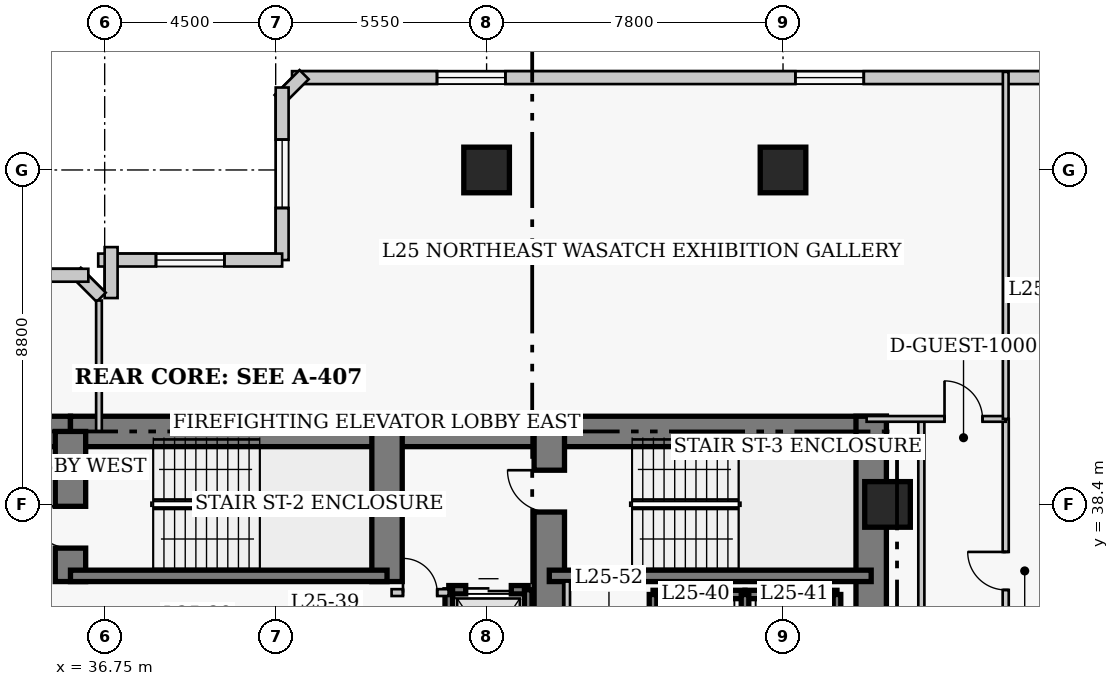
"""IFC4 building model, lengths in metres.
Left out: names, types, materials, properties, quantities, classifications, styles, units other than length and angle.
Written with IfcOpenShell. Run it as: python <this file> out.ifc"""

import sys

from ifc_helpers import new_model, si_unit, direction, frame, frame_2d, origin, origin_2d, place, context, subcontext, project, spatial, rectangle, extrude, element, fill, save


model = new_model("IFC4")
c1 = context("Model", 3, precision=1e-05, world=origin(), true_north=direction((0.0, 1.0)))
c2 = subcontext(c1, "Body", "Model", "MODEL_VIEW")
j1 = project(units=[si_unit("LENGTHUNIT", "METRE"), si_unit("PLANEANGLEUNIT", "RADIAN")], contexts=[c1])
p1 = place(None, origin())
s1 = spatial("IfcSite", under=j1, at=p1, CompositionType="ELEMENT")
p2 = place(p1, origin())
s2 = spatial("IfcBuilding", under=s1, at=p2, CompositionType="ELEMENT")
p3 = place(p2, frame((0.0, 0.0, 103.2)))
s3 = spatial("IfcBuildingStorey", under=s2, at=p3, CompositionType="ELEMENT", Elevation=103.2)
p4 = place(p3, frame((21.5, 40.32, 0.0), z_axis=(0.0, 0.0, 1.0), x_axis=(1.0, 0.0, 0.0)))
e1 = element("IfcWall", 1, at=p4, inside=s3, PredefinedType="SHEAR", context=c2, shape_type="SweptSolid", body=[
    extrude(rectangle(XDim=14.35, YDim=0.8, at=frame_2d((7.175, 0.0))), origin(), (0.0, 0.0, 1.0), 3.8),
])
p5 = place(p3, frame((35.85, 40.32, 0.0), z_axis=(0.0, 0.0, 1.0), x_axis=(1.0, 0.0, 0.0)))
e2 = element("IfcWall", 2, at=p5, inside=s3, PredefinedType="SHEAR", context=c2, shape_type="SweptSolid", body=[
    extrude(rectangle(XDim=12.6, YDim=0.8, at=frame_2d((6.3, 0.0))), origin(), (0.0, 0.0, 1.0), 3.8),
])
p6 = place(p3, frame((48.45, 40.32, 0.0), z_axis=(0.0, 0.0, 1.0), x_axis=(1.0, 0.0, 0.0)))
e3 = element("IfcWall", 3, at=p6, inside=s3, PredefinedType="SHEAR", context=c2, shape_type="SweptSolid", body=[
    extrude(rectangle(XDim=8.87, YDim=0.8, at=frame_2d((4.435, 0.0))), origin(), (0.0, 0.0, 1.0), 3.8),
])
p7 = place(p3, frame((56.92, 27.05, 0.0), z_axis=(0.0, 0.0, 1.0), x_axis=(0.0, 1.0, 0.0)))
e4 = element("IfcWall", 4, at=p7, inside=s3, PredefinedType="SHEAR", context=c2, shape_type="SweptSolid", body=[
    extrude(rectangle(XDim=13.67, YDim=0.8, at=frame_2d((6.835, 0.0))), origin(), (0.0, 0.0, 1.0), 3.8),
])
p8 = place(p3, frame((35.85, 36.37, 0.0), z_axis=(0.0, 0.0, 1.0), x_axis=(0.0, 1.0, 0.0)))
e5 = element("IfcWall", 5, at=p8, inside=s3, PredefinedType="SHEAR", context=c2, shape_type="SweptSolid", body=[
    extrude(rectangle(XDim=3.95, YDim=0.8, at=frame_2d((1.975, 0.0))), origin(), (0.0, 0.0, 1.0), 3.8),
])
p9 = place(p8, frame((0.88, 0.0, 0.0)))
e6 = element("IfcOpeningElement", 6, at=p9, cuts=e5, PredefinedType="OPENING", context=c2, shape_type="SweptSolid", body=[
    extrude(rectangle(XDim=1.1, YDim=2.15, at=frame_2d((0.55, 1.075))), frame((0.0, 0.41, 0.0), z_axis=(0.0, -1.0, 0.0), x_axis=(1.0, 0.0, 0.0)), (0.0, 0.0, 1.0), 0.82),
])
p10 = place(p3, frame((44.18, 36.37, 0.0), z_axis=(0.0, 0.0, 1.0), x_axis=(0.0, 1.0, 0.0)))
e7 = element("IfcWall", 7, at=p10, inside=s3, PredefinedType="SHEAR", context=c2, shape_type="SweptSolid", body=[
    extrude(rectangle(XDim=3.95, YDim=0.8, at=frame_2d((1.975, 0.0))), origin(), (0.0, 0.0, 1.0), 3.8),
])
p11 = place(p3, frame((48.45, 32.35, 0.0), z_axis=(0.0, 0.0, 1.0), x_axis=(0.0, 1.0, 0.0)))
e8 = element("IfcWall", 8, at=p11, inside=s3, PredefinedType="SHEAR", context=c2, shape_type="SweptSolid", body=[
    extrude(rectangle(XDim=7.97, YDim=0.8, at=frame_2d((3.985, 0.0))), origin(), (0.0, 0.0, 1.0), 3.8),
])
p12 = place(p11, frame((5.85, 0.0, 0.0)))
e9 = element("IfcOpeningElement", 9, at=p12, cuts=e8, PredefinedType="OPENING", context=c2, shape_type="SweptSolid", body=[
    extrude(rectangle(XDim=1.1, YDim=2.15, at=frame_2d((0.55, 1.075))), frame((0.0, 0.41, 0.0), z_axis=(0.0, -1.0, 0.0), x_axis=(1.0, 0.0, 0.0)), (0.0, 0.0, 1.0), 0.82),
])
p13 = place(p3, frame((35.85, 36.52, 0.0), z_axis=(0.0, 0.0, 1.0), x_axis=(1.0, 0.0, 0.0)))
e10 = element("IfcWall", 10, at=p13, inside=s3, PredefinedType="SHEAR", context=c2, shape_type="SweptSolid", body=[
    extrude(rectangle(XDim=8.33, YDim=0.3, at=frame_2d((4.165, 0.0))), origin(), (0.0, 0.0, 1.0), 3.8),
])
p14 = place(p3, frame((48.45, 36.52, 0.0), z_axis=(0.0, 0.0, 1.0), x_axis=(1.0, 0.0, 0.0)))
e11 = element("IfcWall", 11, at=p14, inside=s3, PredefinedType="SHEAR", context=c2, shape_type="SweptSolid", body=[
    extrude(rectangle(XDim=8.47, YDim=0.3, at=frame_2d((4.235, 0.0))), origin(), (0.0, 0.0, 1.0), 3.8),
])
for number, where, z_axis, x_axis in (
    (12, (46.8, 47.2, 0.0), (0.0, 0.0, 1.0), (1.0, 0.0, 0.0)),
    (13, (54.6, 47.2, 0.0), (0.0, 0.0, 1.0), (1.0, 0.0, 0.0)),
    (14, (57.35, 38.4, 0.0), (0.0, 0.0, 1.0), (1.0, 0.0, 0.0)),
):
    element("IfcColumn", number, at=place(p3, frame(where, z_axis=z_axis, x_axis=x_axis)), inside=s3, PredefinedType="COLUMN", context=c2, shape_type="SweptSolid", body=[
        extrude(rectangle(XDim=1.2, YDim=1.2, at=origin_2d()), origin(), (0.0, 0.0, 1.0), 3.8),
    ])
p15 = place(p3, frame((69.97, 49.63, 0.0), z_axis=(0.0, 0.0, 1.0), x_axis=(-1.0, 0.0, 0.0)))
e15 = element("IfcWall", 15, at=p15, inside=s3, PredefinedType="SOLIDWALL", context=c2, shape_type="SweptSolid", body=[
    extrude(rectangle(XDim=28.29, YDim=0.34, at=frame_2d((14.145, 0.0))), origin(), (0.0, 0.0, 1.0), 3.54),
])
p16 = place(p15, frame((3.815, 0.0, 0.85)))
e16 = element("IfcOpeningElement", 16, at=p16, cuts=e15, PredefinedType="OPENING", context=c2, shape_type="SweptSolid", body=[
    extrude(rectangle(XDim=1.8, YDim=1.8, at=frame_2d((0.9, 0.9))), frame((0.0, 0.18, 0.0), z_axis=(0.0, -1.0, 0.0), x_axis=(1.0, 0.0, 0.0)), (0.0, 0.0, 1.0), 0.36),
])
p17 = place(p15, frame((13.245, 0.0, 0.85)))
e17 = element("IfcOpeningElement", 17, at=p17, cuts=e15, PredefinedType="OPENING", context=c2, shape_type="SweptSolid", body=[
    extrude(rectangle(XDim=1.8, YDim=1.8, at=frame_2d((0.9, 0.9))), frame((0.0, 0.18, 0.0), z_axis=(0.0, -1.0, 0.0), x_axis=(1.0, 0.0, 0.0)), (0.0, 0.0, 1.0), 0.36),
])
p18 = place(p15, frame((22.675, 0.0, 0.85)))
e18 = element("IfcOpeningElement", 18, at=p18, cuts=e15, PredefinedType="OPENING", context=c2, shape_type="SweptSolid", body=[
    extrude(rectangle(XDim=1.8, YDim=1.8, at=frame_2d((0.9, 0.9))), frame((0.0, 0.18, 0.0), z_axis=(0.0, -1.0, 0.0), x_axis=(1.0, 0.0, 0.0)), (0.0, 0.0, 1.0), 0.36),
])
p19 = place(p3, frame((41.999, 49.708, 0.0), z_axis=(0.0, 0.0, 1.0), x_axis=(-0.707238225886, -0.706975312048, 0.0)))
e19 = element("IfcWall", 19, at=p19, inside=s3, PredefinedType="SOLIDWALL", context=c2, shape_type="SweptSolid", body=[
    extrude(rectangle(XDim=0.929, YDim=0.34, at=frame_2d((0.464, 0.0))), origin(), (0.0, 0.0, 1.0), 3.54),
])
p20 = place(p3, frame((41.42, 49.37, 0.0), z_axis=(0.0, 0.0, 1.0), x_axis=(0.0, -1.0, 0.0)))
e20 = element("IfcWall", 20, at=p20, inside=s3, PredefinedType="SOLIDWALL", context=c2, shape_type="SweptSolid", body=[
    extrude(rectangle(XDim=4.54, YDim=0.34, at=frame_2d((2.27, 0.0))), origin(), (0.0, 0.0, 1.0), 3.54),
])
p21 = place(p20, frame((1.37, 0.0, 0.85)))
e21 = element("IfcOpeningElement", 21, at=p21, cuts=e20, PredefinedType="OPENING", context=c2, shape_type="SweptSolid", body=[
    extrude(rectangle(XDim=1.8, YDim=1.8, at=frame_2d((0.9, 0.9))), frame((0.0, 0.18, 0.0), z_axis=(0.0, -1.0, 0.0), x_axis=(1.0, 0.0, 0.0)), (0.0, 0.0, 1.0), 0.36),
])
p22 = place(p3, frame((41.42, 44.83, 0.0), z_axis=(0.0, 0.0, 1.0), x_axis=(-1.0, 0.0, 0.0)))
e22 = element("IfcWall", 22, at=p22, inside=s3, PredefinedType="SOLIDWALL", context=c2, shape_type="SweptSolid", body=[
    extrude(rectangle(XDim=4.84, YDim=0.34, at=frame_2d((2.42, 0.0))), origin(), (0.0, 0.0, 1.0), 3.54),
])
p23 = place(p22, frame((1.52, 0.0, 0.85)))
e23 = element("IfcOpeningElement", 23, at=p23, cuts=e22, PredefinedType="OPENING", context=c2, shape_type="SweptSolid", body=[
    extrude(rectangle(XDim=1.8, YDim=1.8, at=frame_2d((0.9, 0.9))), frame((0.0, 0.18, 0.0), z_axis=(0.0, -1.0, 0.0), x_axis=(1.0, 0.0, 0.0)), (0.0, 0.0, 1.0), 0.36),
])
p24 = place(p3, frame((36.92, 45.17, 0.0), z_axis=(0.0, 0.0, 1.0), x_axis=(0.0, -1.0, 0.0)))
e24 = element("IfcWall", 24, at=p24, inside=s3, PredefinedType="SOLIDWALL", context=c2, shape_type="SweptSolid", body=[
    extrude(rectangle(XDim=1.34, YDim=0.34, at=frame_2d((0.67, 0.0))), origin(), (0.0, 0.0, 1.0), 3.54),
])
p25 = place(p3, frame((36.658, 43.852, 0.0), z_axis=(0.0, 0.0, 1.0), x_axis=(-0.707238225886, 0.706975312048, 0.0)))
e25 = element("IfcWall", 25, at=p25, inside=s3, PredefinedType="SOLIDWALL", context=c2, shape_type="SweptSolid", body=[
    extrude(rectangle(XDim=0.929, YDim=0.34, at=frame_2d((0.464, 0.0))), origin(), (0.0, 0.0, 1.0), 3.54),
])
p26 = place(p3, frame((36.32, 44.43, 0.0), z_axis=(0.0, 0.0, 1.0), x_axis=(-1.0, 0.0, 0.0)))
e26 = element("IfcWall", 26, at=p26, inside=s3, PredefinedType="SOLIDWALL", context=c2, shape_type="SweptSolid", body=[
    extrude(rectangle(XDim=28.29, YDim=0.34, at=frame_2d((14.145, 0.0))), origin(), (0.0, 0.0, 1.0), 3.54),
])
p27 = place(p26, frame((3.815, 0.0, 0.85)))
e27 = element("IfcOpeningElement", 27, at=p27, cuts=e26, PredefinedType="OPENING", context=c2, shape_type="SweptSolid", body=[
    extrude(rectangle(XDim=1.8, YDim=1.8, at=frame_2d((0.9, 0.9))), frame((0.0, 0.18, 0.0), z_axis=(0.0, -1.0, 0.0), x_axis=(1.0, 0.0, 0.0)), (0.0, 0.0, 1.0), 0.36),
])
p28 = place(p26, frame((13.245, 0.0, 0.85)))
e28 = element("IfcOpeningElement", 28, at=p28, cuts=e26, PredefinedType="OPENING", context=c2, shape_type="SweptSolid", body=[
    extrude(rectangle(XDim=1.8, YDim=1.8, at=frame_2d((0.9, 0.9))), frame((0.0, 0.18, 0.0), z_axis=(0.0, -1.0, 0.0), x_axis=(1.0, 0.0, 0.0)), (0.0, 0.0, 1.0), 0.36),
])
p29 = place(p26, frame((22.675, 0.0, 0.85)))
e29 = element("IfcOpeningElement", 29, at=p29, cuts=e26, PredefinedType="OPENING", context=c2, shape_type="SweptSolid", body=[
    extrude(rectangle(XDim=1.8, YDim=1.8, at=frame_2d((0.9, 0.9))), frame((0.0, 0.18, 0.0), z_axis=(0.0, -1.0, 0.0), x_axis=(1.0, 0.0, 0.0)), (0.0, 0.0, 1.0), 0.36),
])
p30 = place(p3, frame((51.18, 36.03, 0.0), z_axis=(0.0, 0.0, 1.0), x_axis=(1.0, 0.0, 0.0)))
e30 = element("IfcWall", 30, at=p30, inside=s3, PredefinedType="SHEAR", context=c2, shape_type="SweptSolid", body=[
    extrude(rectangle(XDim=2.42, YDim=0.22, at=frame_2d((1.21, 0.0))), origin(), (0.0, 0.0, 1.0), 3.8),
])
p31 = place(p3, frame((51.18, 33.17, 0.0), z_axis=(0.0, 0.0, 1.0), x_axis=(0.0, 1.0, 0.0)))
e31 = element("IfcWall", 31, at=p31, inside=s3, PredefinedType="SHEAR", context=c2, shape_type="SweptSolid", body=[
    extrude(rectangle(XDim=2.86, YDim=0.2, at=frame_2d((1.43, 0.0))), origin(), (0.0, 0.0, 1.0), 3.8),
])
p32 = place(p3, frame((53.6, 36.03, 0.0), z_axis=(0.0, 0.0, 1.0), x_axis=(1.0, 0.0, 0.0)))
e32 = element("IfcWall", 32, at=p32, inside=s3, PredefinedType="SHEAR", context=c2, shape_type="SweptSolid", body=[
    extrude(rectangle(XDim=2.42, YDim=0.22, at=frame_2d((1.21, 0.0))), origin(), (0.0, 0.0, 1.0), 3.8),
])
for number, where, z_axis, x_axis in (
    (33, (53.6, 33.17, 0.0), (0.0, 0.0, 1.0), (0.0, 1.0, 0.0)),
    (34, (56.02, 33.17, 0.0), (0.0, 0.0, 1.0), (0.0, 1.0, 0.0)),
):
    element("IfcWall", number, at=place(p3, frame(where, z_axis=z_axis, x_axis=x_axis)), inside=s3, PredefinedType="SHEAR", context=c2, shape_type="SweptSolid", body=[
        extrude(rectangle(XDim=2.86, YDim=0.2, at=frame_2d((1.43, 0.0))), origin(), (0.0, 0.0, 1.0), 3.8),
    ])
p33 = place(p3, frame((45.805, 36.155, 0.0), z_axis=(0.0, 0.0, 1.0), x_axis=(1.0, 0.0, 0.0)))
e35 = element("IfcWall", 35, at=p33, inside=s3, PredefinedType="SHEAR", context=c2, shape_type="SweptSolid", body=[
    extrude(rectangle(XDim=2.09, YDim=0.22, at=frame_2d((1.045, 0.0))), origin(), (0.0, 0.0, 1.0), 3.8),
])
p34 = place(p33, frame((0.445, 0.0, 0.0)))
e36 = element("IfcOpeningElement", 36, at=p34, cuts=e35, PredefinedType="OPENING", context=c2, shape_type="SweptSolid", body=[
    extrude(rectangle(XDim=1.2, YDim=2.15, at=frame_2d((0.6, 1.075))), frame((0.0, 0.12, 0.0), z_axis=(0.0, -1.0, 0.0), x_axis=(1.0, 0.0, 0.0)), (0.0, 0.0, 1.0), 0.24),
])
p35 = place(p3, frame((45.805, 32.65, 0.0), z_axis=(0.0, 0.0, 1.0), x_axis=(0.0, 1.0, 0.0)))
e37 = element("IfcWall", 37, at=p35, inside=s3, PredefinedType="SHEAR", context=c2, shape_type="SweptSolid", body=[
    extrude(rectangle(XDim=3.505, YDim=0.2, at=frame_2d((1.752, 0.0))), origin(), (0.0, 0.0, 1.0), 3.8),
])
p36 = place(p3, frame((47.895, 33.245, 0.0), z_axis=(0.0, 0.0, 1.0), x_axis=(0.0, 1.0, 0.0)))
e38 = element("IfcWall", 38, at=p36, inside=s3, PredefinedType="SHEAR", context=c2, shape_type="SweptSolid", body=[
    extrude(rectangle(XDim=2.91, YDim=0.2, at=frame_2d((1.455, 0.0))), origin(), (0.0, 0.0, 1.0), 3.8),
])
p37 = place(p3, frame((44.3, 36.08, 0.0), z_axis=(0.0, 0.0, 1.0), x_axis=(1.0, 0.0, 0.0)))
e39 = element("IfcWall", 39, at=p37, inside=s3, PredefinedType="PARTITIONING", context=c2, shape_type="SweptSolid", body=[
    extrude(rectangle(XDim=1.5, YDim=0.18, at=frame_2d((0.75, 0.0))), origin(), (0.0, 0.0, 1.0), 3.54),
])
p38 = place(p37, frame((0.3, 0.0, 0.0)))
e40 = element("IfcOpeningElement", 40, at=p38, cuts=e39, PredefinedType="OPENING", context=c2, shape_type="SweptSolid", body=[
    extrude(rectangle(XDim=0.9, YDim=2.15, at=frame_2d((0.45, 1.075))), frame((0.0, 0.1, 0.0), z_axis=(0.0, -1.0, 0.0), x_axis=(1.0, 0.0, 0.0)), (0.0, 0.0, 1.0), 0.2),
])
p39 = place(p3, frame((48.92, 32.75, 0.0), z_axis=(0.0, 0.0, 1.0), x_axis=(0.0, 1.0, 0.0)))
e41 = element("IfcWall", 41, at=p39, inside=s3, PredefinedType="PARTITIONING", context=c2, shape_type="SweptSolid", body=[
    extrude(rectangle(XDim=3.62, YDim=0.15, at=frame_2d((1.81, 0.0))), origin(), (0.0, 0.0, 1.0), 3.54),
])
p40 = place(p3, frame((60.46, 11.85, 0.0), z_axis=(0.0, 0.0, 1.0), x_axis=(0.0, 1.0, 0.0)))
e42 = element("IfcWall", 42, at=p40, inside=s3, PredefinedType="PARTITIONING", context=c2, shape_type="SweptSolid", body=[
    extrude(rectangle(XDim=28.8, YDim=0.16, at=frame_2d((14.4, 0.0))), origin(), (0.0, 0.0, 1.0), 3.54),
])
p41 = place(p40, frame((3.6, 0.0, 0.0)))
e43 = element("IfcOpeningElement", 43, at=p41, cuts=e42, PredefinedType="OPENING", context=c2, shape_type="SweptSolid", body=[
    extrude(rectangle(XDim=0.95, YDim=2.1, at=frame_2d((0.475, 1.05))), frame((0.0, 0.09, 0.0), z_axis=(0.0, -1.0, 0.0), x_axis=(1.0, 0.0, 0.0)), (0.0, 0.0, 1.0), 0.18),
])
p42 = place(p40, frame((12.075, 0.0, 0.0)))
e44 = element("IfcOpeningElement", 44, at=p42, cuts=e42, PredefinedType="OPENING", context=c2, shape_type="SweptSolid", body=[
    extrude(rectangle(XDim=0.95, YDim=2.1, at=frame_2d((0.475, 1.05))), frame((0.0, 0.09, 0.0), z_axis=(0.0, -1.0, 0.0), x_axis=(1.0, 0.0, 0.0)), (0.0, 0.0, 1.0), 0.18),
])
p43 = place(p40, frame((19.875, 0.0, 0.0)))
e45 = element("IfcOpeningElement", 45, at=p43, cuts=e42, PredefinedType="OPENING", context=c2, shape_type="SweptSolid", body=[
    extrude(rectangle(XDim=0.95, YDim=2.1, at=frame_2d((0.475, 1.05))), frame((0.0, 0.09, 0.0), z_axis=(0.0, -1.0, 0.0), x_axis=(1.0, 0.0, 0.0)), (0.0, 0.0, 1.0), 0.18),
])
p44 = place(p40, frame((24.3, 0.0, 0.0)))
e46 = element("IfcOpeningElement", 46, at=p44, cuts=e42, PredefinedType="OPENING", context=c2, shape_type="SweptSolid", body=[
    extrude(rectangle(XDim=1.0, YDim=2.15, at=frame_2d((0.5, 1.075))), frame((0.0, 0.09, 0.0), z_axis=(0.0, -1.0, 0.0), x_axis=(1.0, 0.0, 0.0)), (0.0, 0.0, 1.0), 0.18),
])
p45 = place(p3, frame((58.24, 26.36, 0.0), z_axis=(0.0, 0.0, 1.0), x_axis=(0.0, 1.0, 0.0)))
e47 = element("IfcWall", 47, at=p45, inside=s3, PredefinedType="PARTITIONING", context=c2, shape_type="SweptSolid", body=[
    extrude(rectangle(XDim=14.29, YDim=0.16, at=frame_2d((7.145, 0.0))), origin(), (0.0, 0.0, 1.0), 3.54),
])
p46 = place(p3, frame((56.8, 40.65, 0.0), z_axis=(0.0, 0.0, 1.0), x_axis=(1.0, 0.0, 0.0)))
e48 = element("IfcWall", 48, at=p46, inside=s3, PredefinedType="PARTITIONING", context=c2, shape_type="SweptSolid", body=[
    extrude(rectangle(XDim=3.66, YDim=0.15, at=frame_2d((1.83, 0.0))), origin(), (0.0, 0.0, 1.0), 3.54),
])
p47 = place(p46, frame((2.05, 0.0, 0.0)))
e49 = element("IfcOpeningElement", 49, at=p47, cuts=e48, PredefinedType="OPENING", context=c2, shape_type="SweptSolid", body=[
    extrude(rectangle(XDim=1.0, YDim=2.15, at=frame_2d((0.5, 1.075))), frame((0.0, 0.085, 0.0), z_axis=(0.0, -1.0, 0.0), x_axis=(1.0, 0.0, 0.0)), (0.0, 0.0, 1.0), 0.17),
])
p48 = place(p3, frame((36.6, 40.32, 0.0), z_axis=(0.0, 0.0, 1.0), x_axis=(0.0, 1.0, 0.0)))
e50 = element("IfcWall", 50, at=p48, inside=s3, PredefinedType="PARTITIONING", context=c2, shape_type="SweptSolid", body=[
    extrude(rectangle(XDim=3.445, YDim=0.15, at=frame_2d((1.723, 0.0))), origin(), (0.0, 0.0, 1.0), 3.54),
])
p49 = place(p3, frame((60.46, 40.65, 0.0), z_axis=(0.0, 0.0, 1.0), x_axis=(0.0, 1.0, 0.0)))
e51 = element("IfcWall", 51, at=p49, inside=s3, PredefinedType="PARTITIONING", context=c2, shape_type="SweptSolid", body=[
    extrude(rectangle(XDim=9.13, YDim=0.15, at=frame_2d((4.565, 0.0))), origin(), (0.0, 0.0, 1.0), 3.54),
])
p50 = place(p17, origin())
e52 = element("IfcWindow", 52, at=p50, inside=s3, PartitioningType="SINGLE_PANEL", PredefinedType="WINDOW", context=c2, shape_type="SweptSolid", body=[
    extrude(rectangle(XDim=1.8, YDim=1.8, at=frame_2d((0.9, 0.9))), frame((0.0, 0.03, 0.0), z_axis=(0.0, -1.0, 0.0), x_axis=(1.0, 0.0, 0.0)), (0.0, 0.0, 1.0), 0.06),
])
fill(e17, e52)
p51 = place(p18, origin())
e53 = element("IfcWindow", 53, at=p51, inside=s3, PartitioningType="SINGLE_PANEL", PredefinedType="WINDOW", context=c2, shape_type="SweptSolid", body=[
    extrude(rectangle(XDim=1.8, YDim=1.8, at=frame_2d((0.9, 0.9))), frame((0.0, 0.03, 0.0), z_axis=(0.0, -1.0, 0.0), x_axis=(1.0, 0.0, 0.0)), (0.0, 0.0, 1.0), 0.06),
])
fill(e18, e53)
p52 = place(p21, origin())
e54 = element("IfcWindow", 54, at=p52, inside=s3, PartitioningType="SINGLE_PANEL", PredefinedType="WINDOW", context=c2, shape_type="SweptSolid", body=[
    extrude(rectangle(XDim=1.8, YDim=1.8, at=frame_2d((0.9, 0.9))), frame((0.0, 0.03, 0.0), z_axis=(0.0, -1.0, 0.0), x_axis=(1.0, 0.0, 0.0)), (0.0, 0.0, 1.0), 0.06),
])
fill(e21, e54)
p53 = place(p23, origin())
e55 = element("IfcWindow", 55, at=p53, inside=s3, PartitioningType="SINGLE_PANEL", PredefinedType="WINDOW", context=c2, shape_type="SweptSolid", body=[
    extrude(rectangle(XDim=1.8, YDim=1.8, at=frame_2d((0.9, 0.9))), frame((0.0, 0.03, 0.0), z_axis=(0.0, -1.0, 0.0), x_axis=(1.0, 0.0, 0.0)), (0.0, 0.0, 1.0), 0.06),
])
fill(e23, e55)
p54 = place(p34, origin())
e56 = element("IfcDoor", 56, at=p54, inside=s3, OperationType="DOUBLE_DOOR_SLIDING", PredefinedType="DOOR", context=c2, shape_type="SweptSolid", body=[
    extrude(rectangle(XDim=1.2, YDim=2.15, at=frame_2d((0.6, 1.075))), frame((0.0, 0.025, 0.0), z_axis=(0.0, -1.0, 0.0), x_axis=(1.0, 0.0, 0.0)), (0.0, 0.0, 1.0), 0.05),
])
fill(e36, e56)
p55 = place(p38, origin())
e57 = element("IfcDoor", 57, at=p55, inside=s3, OperationType="SINGLE_SWING_LEFT", PredefinedType="DOOR", context=c2, shape_type="SweptSolid", body=[
    extrude(rectangle(XDim=0.9, YDim=2.15, at=frame_2d((0.45, 1.075))), frame((0.0, 0.025, 0.0), z_axis=(0.0, -1.0, 0.0), x_axis=(1.0, 0.0, 0.0)), (0.0, 0.0, 1.0), 0.05),
])
fill(e40, e57)
p56 = place(p47, origin())
e58 = element("IfcDoor", 58, at=p56, inside=s3, OperationType="SINGLE_SWING_LEFT", PredefinedType="DOOR", context=c2, shape_type="SweptSolid", body=[
    extrude(rectangle(XDim=1.0, YDim=2.15, at=frame_2d((0.5, 1.075))), frame((0.0, 0.025, 0.0), z_axis=(0.0, -1.0, 0.0), x_axis=(1.0, 0.0, 0.0)), (0.0, 0.0, 1.0), 0.05),
])
fill(e49, e58)
p57 = place(p44, origin())
e59 = element("IfcDoor", 59, at=p57, inside=s3, OperationType="SINGLE_SWING_RIGHT", PredefinedType="DOOR", context=c2, shape_type="SweptSolid", body=[
    extrude(rectangle(XDim=1.0, YDim=2.15, at=frame_2d((0.5, 1.075))), frame((0.0, 0.025, 0.0), z_axis=(0.0, -1.0, 0.0), x_axis=(1.0, 0.0, 0.0)), (0.0, 0.0, 1.0), 0.05),
])
fill(e46, e59)
p58 = place(p9, origin())
e60 = element("IfcDoor", 60, at=p58, inside=s3, OperationType="SINGLE_SWING_RIGHT", PredefinedType="DOOR", context=c2, shape_type="SweptSolid", body=[
    extrude(rectangle(XDim=1.1, YDim=2.15, at=frame_2d((0.55, 1.075))), frame((0.0, 0.025, 0.0), z_axis=(0.0, -1.0, 0.0), x_axis=(1.0, 0.0, 0.0)), (0.0, 0.0, 1.0), 0.05),
])
fill(e6, e60)
p59 = place(p12, origin())
e61 = element("IfcDoor", 61, at=p59, inside=s3, OperationType="SINGLE_SWING_RIGHT", PredefinedType="DOOR", context=c2, shape_type="SweptSolid", body=[
    extrude(rectangle(XDim=1.1, YDim=2.15, at=frame_2d((0.55, 1.075))), frame((0.0, 0.025, 0.0), z_axis=(0.0, -1.0, 0.0), x_axis=(1.0, 0.0, 0.0)), (0.0, 0.0, 1.0), 0.05),
])
fill(e9, e61)
save(model, sys.argv[1])
